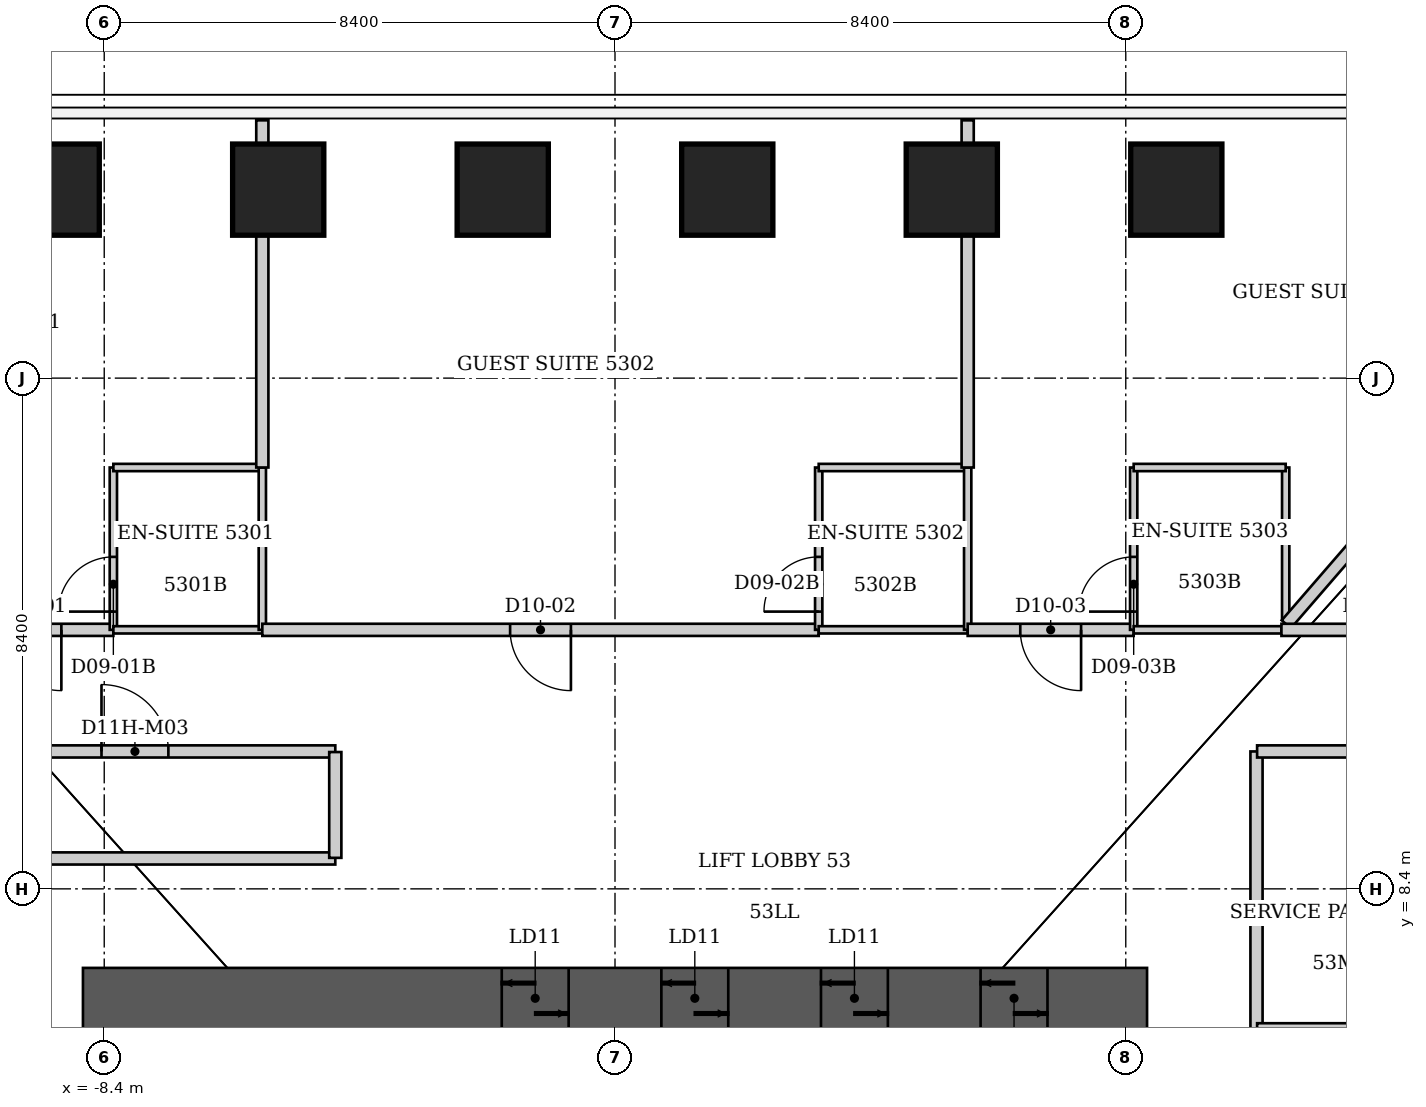
"""IFC4 building model, lengths in metres.
Left out: names, types, materials, properties, quantities, classifications, styles, units other than length and angle.
Written with IfcOpenShell. Run it as: python <this file> out.ifc"""

import sys

from ifc_helpers import new_model, si_unit, direction, frame, frame_2d, origin, origin_2d, place, context, subcontext, project, spatial, rectangle, extrude, element, fill, save


model = new_model("IFC4")
c1 = context("Model", 3, precision=1e-05, world=origin(), true_north=direction((0.0, 1.0)))
c2 = subcontext(c1, "Body", "Model", "MODEL_VIEW")
j1 = project(units=[si_unit("LENGTHUNIT", "METRE"), si_unit("PLANEANGLEUNIT", "RADIAN")], contexts=[c1])
p1 = place(None, origin())
s1 = spatial("IfcSite", under=j1, at=p1, CompositionType="ELEMENT")
p2 = place(p1, origin())
s2 = spatial("IfcBuilding", under=s1, at=p2, CompositionType="ELEMENT")
p3 = place(p2, frame((0.0, 0.0, 213.6)))
s3 = spatial("IfcBuildingStorey", under=s2, at=p3, CompositionType="ELEMENT", Elevation=213.6)
for number, where, z_axis, x_axis in (
    (1, (-9.231, 19.9, 0.0), (0.0, 0.0, 1.0), (0.0, 1.0, 0.0)),
    (2, (-5.539, 19.9, 0.0), (0.0, 0.0, 1.0), (0.0, 1.0, 0.0)),
    (3, (-1.846, 19.9, 0.0), (0.0, 0.0, 1.0), (0.0, 1.0, 0.0)),
    (4, (1.846, 19.9, 0.0), (0.0, 0.0, 1.0), (0.0, 1.0, 0.0)),
    (5, (5.539, 19.9, 0.0), (0.0, 0.0, 1.0), (0.0, 1.0, 0.0)),
    (6, (9.231, 19.9, 0.0), (0.0, 0.0, 1.0), (0.0, 1.0, 0.0)),
):
    element("IfcColumn", number, at=place(p3, frame(where, z_axis=z_axis, x_axis=x_axis)), inside=s3, PredefinedType="COLUMN", context=c2, shape_type="SweptSolid", body=[
        extrude(rectangle(XDim=1.5, YDim=1.5, at=origin_2d()), origin(), (0.0, 0.0, 1.0), 3.8),
    ])
p4 = place(p3, frame((-8.75, 6.6, 0.0), z_axis=(0.0, 0.0, 1.0), x_axis=(1.0, 0.0, 0.0)))
e7 = element("IfcWall", 7, at=p4, inside=s3, PredefinedType="SHEAR", context=c2, shape_type="SweptSolid", body=[
    extrude(rectangle(XDim=17.5, YDim=1.0, at=frame_2d((8.75, 0.0))), origin(), (0.0, 0.0, 1.0), 3.8),
])
p5 = place(p4, frame((6.887, 0.0, 0.0)))
e8 = element("IfcOpeningElement", 8, at=p5, cuts=e7, PredefinedType="OPENING", context=c2, shape_type="SweptSolid", body=[
    extrude(rectangle(XDim=1.1, YDim=2.1, at=frame_2d((0.55, 1.05))), frame((0.0, 0.5, 0.0), z_axis=(0.0, -1.0, 0.0), x_axis=(1.0, 0.0, 0.0)), (0.0, 0.0, 1.0), 1.0),
])
p6 = place(p4, frame((9.512, 0.0, 0.0)))
e9 = element("IfcOpeningElement", 9, at=p6, cuts=e7, PredefinedType="OPENING", context=c2, shape_type="SweptSolid", body=[
    extrude(rectangle(XDim=1.1, YDim=2.1, at=frame_2d((0.55, 1.05))), frame((0.0, 0.5, 0.0), z_axis=(0.0, -1.0, 0.0), x_axis=(1.0, 0.0, 0.0)), (0.0, 0.0, 1.0), 1.0),
])
p7 = place(p4, frame((12.137, 0.0, 0.0)))
e10 = element("IfcOpeningElement", 10, at=p7, cuts=e7, PredefinedType="OPENING", context=c2, shape_type="SweptSolid", body=[
    extrude(rectangle(XDim=1.1, YDim=2.1, at=frame_2d((0.55, 1.05))), frame((0.0, 0.5, 0.0), z_axis=(0.0, -1.0, 0.0), x_axis=(1.0, 0.0, 0.0)), (0.0, 0.0, 1.0), 1.0),
])
p8 = place(p4, frame((14.762, 0.0, 0.0)))
e11 = element("IfcOpeningElement", 11, at=p8, cuts=e7, PredefinedType="OPENING", context=c2, shape_type="SweptSolid", body=[
    extrude(rectangle(XDim=1.1, YDim=2.1, at=frame_2d((0.55, 1.05))), frame((0.0, 0.5, 0.0), z_axis=(0.0, -1.0, 0.0), x_axis=(1.0, 0.0, 0.0)), (0.0, 0.0, 1.0), 1.0),
])
p9 = place(p3, frame((-11.19, 10.66, 0.0), z_axis=(0.0, 0.0, 1.0), x_axis=(1.0, 0.0, 0.0)))
e12 = element("IfcWall", 12, at=p9, inside=s3, PredefinedType="PARTITIONING", context=c2, shape_type="SweptSolid", body=[
    extrude(rectangle(XDim=6.59, YDim=0.2, at=frame_2d((3.295, 0.0))), origin(), (0.0, 0.0, 1.0), 3.64),
])
p10 = place(p9, frame((2.745, 0.0, 0.0)))
e13 = element("IfcOpeningElement", 13, at=p10, cuts=e12, PredefinedType="OPENING", context=c2, shape_type="SweptSolid", body=[
    extrude(rectangle(XDim=1.1, YDim=2.2, at=frame_2d((0.55, 1.1))), frame((0.0, 0.1, 0.0), z_axis=(0.0, -1.0, 0.0), x_axis=(1.0, 0.0, 0.0)), (0.0, 0.0, 1.0), 0.2),
])
p11 = place(p3, frame((-8.25, 12.66, 0.0), z_axis=(0.0, 0.0, 1.0), x_axis=(-1.0, 0.0, 0.0)))
e14 = element("IfcWall", 14, at=p11, inside=s3, PredefinedType="PARTITIONING", context=c2, shape_type="SweptSolid", body=[
    extrude(rectangle(XDim=2.71, YDim=0.2, at=frame_2d((1.355, 0.0))), origin(), (0.0, 0.0, 1.0), 3.64),
])
p12 = place(p11, frame((0.855, 0.0, 0.0)))
e15 = element("IfcOpeningElement", 15, at=p12, cuts=e14, PredefinedType="OPENING", context=c2, shape_type="SweptSolid", body=[
    extrude(rectangle(XDim=1.0, YDim=2.13, at=frame_2d((0.5, 1.065))), frame((0.0, 0.1, 0.0), z_axis=(0.0, -1.0, 0.0), x_axis=(1.0, 0.0, 0.0)), (0.0, 0.0, 1.0), 0.2),
])
p13 = place(p3, frame((-8.25, 15.33, 0.0), z_axis=(0.0, 0.0, 1.0), x_axis=(0.0, -1.0, 0.0)))
e16 = element("IfcWall", 16, at=p13, inside=s3, PredefinedType="PARTITIONING", context=c2, shape_type="SweptSolid", body=[
    extrude(rectangle(XDim=2.67, YDim=0.12, at=frame_2d((1.335, 0.0))), origin(), (0.0, 0.0, 1.0), 3.64),
])
p14 = place(p13, frame((1.47, 0.0, 0.0)))
e17 = element("IfcOpeningElement", 17, at=p14, cuts=e16, PredefinedType="OPENING", context=c2, shape_type="SweptSolid", body=[
    extrude(rectangle(XDim=0.9, YDim=2.03, at=frame_2d((0.45, 1.015))), frame((0.0, 0.06, 0.0), z_axis=(0.0, -1.0, 0.0), x_axis=(1.0, 0.0, 0.0)), (0.0, 0.0, 1.0), 0.12),
])
for number, where, z_axis, x_axis in (
    (18, (-5.8, 12.66, 0.0), (0.0, 0.0, 1.0), (-1.0, 0.0, 0.0)),
    (19, (-5.8, 15.33, 0.0), (0.0, 0.0, 1.0), (-1.0, 0.0, 0.0)),
):
    element("IfcWall", number, at=place(p3, frame(where, z_axis=z_axis, x_axis=x_axis)), inside=s3, PredefinedType="PARTITIONING", context=c2, shape_type="SweptSolid", body=[
        extrude(rectangle(XDim=2.45, YDim=0.12, at=frame_2d((1.225, 0.0))), origin(), (0.0, 0.0, 1.0), 3.64),
    ])
p15 = place(p3, frame((-5.8, 15.33, 0.0), z_axis=(0.0, 0.0, 1.0), x_axis=(0.0, -1.0, 0.0)))
e20 = element("IfcWall", 20, at=p15, inside=s3, PredefinedType="PARTITIONING", context=c2, shape_type="SweptSolid", body=[
    extrude(rectangle(XDim=2.67, YDim=0.12, at=frame_2d((1.335, 0.0))), origin(), (0.0, 0.0, 1.0), 3.64),
])
p16 = place(p3, frame((-5.8, 21.04, 0.0), z_axis=(0.0, 0.0, 1.0), x_axis=(0.0, -1.0, 0.0)))
e21 = element("IfcWall", 21, at=p16, inside=s3, PredefinedType="PARTITIONING", context=c2, shape_type="SweptSolid", body=[
    extrude(rectangle(XDim=5.71, YDim=0.2, at=frame_2d((2.855, 0.0))), origin(), (0.0, 0.0, 1.0), 3.64),
])
p17 = place(p3, frame((-4.6, 8.9, 0.0), z_axis=(0.0, 0.0, 1.0), x_axis=(-1.0, 0.0, 0.0)))
e22 = element("IfcWall", 22, at=p17, inside=s3, PredefinedType="PARTITIONING", context=c2, shape_type="SweptSolid", body=[
    extrude(rectangle(XDim=5.95, YDim=0.2, at=frame_2d((2.975, 0.0))), origin(), (0.0, 0.0, 1.0), 3.64),
])
p18 = place(p3, frame((-4.6, 10.65, 0.0), z_axis=(0.0, 0.0, 1.0), x_axis=(0.0, -1.0, 0.0)))
e23 = element("IfcWall", 23, at=p18, inside=s3, PredefinedType="PARTITIONING", context=c2, shape_type="SweptSolid", body=[
    extrude(rectangle(XDim=1.74, YDim=0.2, at=frame_2d((0.87, 0.0))), origin(), (0.0, 0.0, 1.0), 3.64),
])
p19 = place(p3, frame((3.35, 12.66, 0.0), z_axis=(0.0, 0.0, 1.0), x_axis=(-1.0, 0.0, 0.0)))
e24 = element("IfcWall", 24, at=p19, inside=s3, PredefinedType="PARTITIONING", context=c2, shape_type="SweptSolid", body=[
    extrude(rectangle(XDim=9.15, YDim=0.2, at=frame_2d((4.575, 0.0))), origin(), (0.0, 0.0, 1.0), 3.64),
])
p20 = place(p19, frame((4.075, 0.0, 0.0)))
e25 = element("IfcOpeningElement", 25, at=p20, cuts=e24, PredefinedType="OPENING", context=c2, shape_type="SweptSolid", body=[
    extrude(rectangle(XDim=1.0, YDim=2.13, at=frame_2d((0.5, 1.065))), frame((0.0, 0.1, 0.0), z_axis=(0.0, -1.0, 0.0), x_axis=(1.0, 0.0, 0.0)), (0.0, 0.0, 1.0), 0.2),
])
p21 = place(p3, frame((3.35, 15.33, 0.0), z_axis=(0.0, 0.0, 1.0), x_axis=(0.0, -1.0, 0.0)))
e26 = element("IfcWall", 26, at=p21, inside=s3, PredefinedType="PARTITIONING", context=c2, shape_type="SweptSolid", body=[
    extrude(rectangle(XDim=2.67, YDim=0.12, at=frame_2d((1.335, 0.0))), origin(), (0.0, 0.0, 1.0), 3.64),
])
p22 = place(p21, frame((1.47, 0.0, 0.0)))
e27 = element("IfcOpeningElement", 27, at=p22, cuts=e26, PredefinedType="OPENING", context=c2, shape_type="SweptSolid", body=[
    extrude(rectangle(XDim=0.9, YDim=2.03, at=frame_2d((0.45, 1.015))), frame((0.0, 0.06, 0.0), z_axis=(0.0, -1.0, 0.0), x_axis=(1.0, 0.0, 0.0)), (0.0, 0.0, 1.0), 0.12),
])
for number, where, z_axis, x_axis in (
    (28, (5.8, 12.66, 0.0), (0.0, 0.0, 1.0), (-1.0, 0.0, 0.0)),
    (29, (5.8, 15.33, 0.0), (0.0, 0.0, 1.0), (-1.0, 0.0, 0.0)),
):
    element("IfcWall", number, at=place(p3, frame(where, z_axis=z_axis, x_axis=x_axis)), inside=s3, PredefinedType="PARTITIONING", context=c2, shape_type="SweptSolid", body=[
        extrude(rectangle(XDim=2.45, YDim=0.12, at=frame_2d((1.225, 0.0))), origin(), (0.0, 0.0, 1.0), 3.64),
    ])
p23 = place(p3, frame((5.8, 15.33, 0.0), z_axis=(0.0, 0.0, 1.0), x_axis=(0.0, -1.0, 0.0)))
e30 = element("IfcWall", 30, at=p23, inside=s3, PredefinedType="PARTITIONING", context=c2, shape_type="SweptSolid", body=[
    extrude(rectangle(XDim=2.67, YDim=0.12, at=frame_2d((1.335, 0.0))), origin(), (0.0, 0.0, 1.0), 3.64),
])
p24 = place(p3, frame((5.8, 21.04, 0.0), z_axis=(0.0, 0.0, 1.0), x_axis=(0.0, -1.0, 0.0)))
e31 = element("IfcWall", 31, at=p24, inside=s3, PredefinedType="PARTITIONING", context=c2, shape_type="SweptSolid", body=[
    extrude(rectangle(XDim=5.71, YDim=0.2, at=frame_2d((2.855, 0.0))), origin(), (0.0, 0.0, 1.0), 3.64),
])
p25 = place(p3, frame((8.53, 12.66, 0.0), z_axis=(0.0, 0.0, 1.0), x_axis=(-1.0, 0.0, 0.0)))
e32 = element("IfcWall", 32, at=p25, inside=s3, PredefinedType="PARTITIONING", context=c2, shape_type="SweptSolid", body=[
    extrude(rectangle(XDim=2.73, YDim=0.2, at=frame_2d((1.365, 0.0))), origin(), (0.0, 0.0, 1.0), 3.64),
])
p26 = place(p25, frame((0.865, 0.0, 0.0)))
e33 = element("IfcOpeningElement", 33, at=p26, cuts=e32, PredefinedType="OPENING", context=c2, shape_type="SweptSolid", body=[
    extrude(rectangle(XDim=1.0, YDim=2.13, at=frame_2d((0.5, 1.065))), frame((0.0, 0.1, 0.0), z_axis=(0.0, -1.0, 0.0), x_axis=(1.0, 0.0, 0.0)), (0.0, 0.0, 1.0), 0.2),
])
p27 = place(p3, frame((8.53, 15.33, 0.0), z_axis=(0.0, 0.0, 1.0), x_axis=(0.0, -1.0, 0.0)))
e34 = element("IfcWall", 34, at=p27, inside=s3, PredefinedType="PARTITIONING", context=c2, shape_type="SweptSolid", body=[
    extrude(rectangle(XDim=2.67, YDim=0.12, at=frame_2d((1.335, 0.0))), origin(), (0.0, 0.0, 1.0), 3.64),
])
p28 = place(p27, frame((1.47, 0.0, 0.0)))
e35 = element("IfcOpeningElement", 35, at=p28, cuts=e34, PredefinedType="OPENING", context=c2, shape_type="SweptSolid", body=[
    extrude(rectangle(XDim=0.9, YDim=2.03, at=frame_2d((0.45, 1.015))), frame((0.0, 0.06, 0.0), z_axis=(0.0, -1.0, 0.0), x_axis=(1.0, 0.0, 0.0)), (0.0, 0.0, 1.0), 0.12),
])
p29 = place(p3, frame((10.55, 6.09, 0.0), z_axis=(0.0, 0.0, 1.0), x_axis=(0.0, 1.0, 0.0)))
e36 = element("IfcWall", 36, at=p29, inside=s3, PredefinedType="PARTITIONING", context=c2, shape_type="SweptSolid", body=[
    extrude(rectangle(XDim=4.57, YDim=0.2, at=frame_2d((2.285, 0.0))), origin(), (0.0, 0.0, 1.0), 3.64),
])
p30 = place(p3, frame((10.56, 10.66, 0.0), z_axis=(0.0, 0.0, 1.0), x_axis=(1.0, 0.0, 0.0)))
e37 = element("IfcWall", 37, at=p30, inside=s3, PredefinedType="PARTITIONING", context=c2, shape_type="SweptSolid", body=[
    extrude(rectangle(XDim=1.79, YDim=0.2, at=frame_2d((0.895, 0.0))), origin(), (0.0, 0.0, 1.0), 3.64),
])
p31 = place(p3, frame((10.96, 12.66, 0.0), z_axis=(0.0, 0.0, 1.0), x_axis=(-1.0, 0.0, 0.0)))
e38 = element("IfcWall", 38, at=p31, inside=s3, PredefinedType="PARTITIONING", context=c2, shape_type="SweptSolid", body=[
    extrude(rectangle(XDim=2.43, YDim=0.12, at=frame_2d((1.215, 0.0))), origin(), (0.0, 0.0, 1.0), 3.64),
])
p32 = place(p3, frame((11.03, 12.83, 0.0), z_axis=(0.0, 0.0, 1.0), x_axis=(0.0, 1.0, 0.0)))
e39 = element("IfcWall", 39, at=p32, inside=s3, PredefinedType="PARTITIONING", context=c2, shape_type="SweptSolid", body=[
    extrude(rectangle(XDim=2.5, YDim=0.12, at=frame_2d((1.25, 0.0))), origin(), (0.0, 0.0, 1.0), 3.038),
])
p33 = place(p3, frame((11.03, 15.33, 0.0), z_axis=(0.0, 0.0, 1.0), x_axis=(-1.0, 0.0, 0.0)))
e40 = element("IfcWall", 40, at=p33, inside=s3, PredefinedType="PARTITIONING", context=c2, shape_type="SweptSolid", body=[
    extrude(rectangle(XDim=2.5, YDim=0.12, at=frame_2d((1.25, 0.0))), origin(), (0.0, 0.0, 1.0), 3.64),
])
p34 = place(p3, frame((11.04, 12.751, 0.0), z_axis=(0.0, 0.0, 1.0), x_axis=(0.654384042683, 0.756162366613, 0.0)))
e41 = element("IfcWall", 41, at=p34, inside=s3, PredefinedType="PARTITIONING", context=c2, shape_type="SweptSolid", body=[
    extrude(rectangle(XDim=10.667, YDim=0.2, at=frame_2d((5.333, 0.0))), origin(), (0.0, 0.0, 1.0), 3.64),
])
p35 = place(p3, frame((13.5, 12.66, 0.0), z_axis=(0.0, 0.0, 1.0), x_axis=(-1.0, 0.0, 0.0)))
e42 = element("IfcWall", 42, at=p35, inside=s3, PredefinedType="PARTITIONING", context=c2, shape_type="SweptSolid", body=[
    extrude(rectangle(XDim=2.54, YDim=0.2, at=frame_2d((1.27, 0.0))), origin(), (0.0, 0.0, 1.0), 3.64),
])
p36 = place(p35, frame((0.45, 0.0, 0.0)))
e43 = element("IfcOpeningElement", 43, at=p36, cuts=e42, PredefinedType="OPENING", context=c2, shape_type="SweptSolid", body=[
    extrude(rectangle(XDim=1.0, YDim=2.13, at=frame_2d((0.5, 1.065))), frame((0.0, 0.1, 0.0), z_axis=(0.0, -1.0, 0.0), x_axis=(1.0, 0.0, 0.0)), (0.0, 0.0, 1.0), 0.2),
])
p37 = place(p3, frame((14.915, 6.09, 0.0), z_axis=(0.0, 0.0, 1.0), x_axis=(-1.0, 0.0, 0.0)))
e44 = element("IfcWall", 44, at=p37, inside=s3, PredefinedType="PARTITIONING", context=c2, shape_type="SweptSolid", body=[
    extrude(rectangle(XDim=4.355, YDim=0.2, at=frame_2d((2.177, 0.0))), origin(), (0.0, 0.0, 1.0), 3.64),
])
p38 = place(p12, origin())
e45 = element("IfcDoor", 45, at=p38, inside=s3, OperationType="SINGLE_SWING_LEFT", PredefinedType="DOOR", context=c2, shape_type="SweptSolid", body=[
    extrude(rectangle(XDim=1.0, YDim=2.13, at=frame_2d((0.5, 1.065))), frame((0.0, 0.025, 0.0), z_axis=(0.0, -1.0, 0.0), x_axis=(1.0, 0.0, 0.0)), (0.0, 0.0, 1.0), 0.05),
])
fill(e15, e45)
p39 = place(p14, origin())
e46 = element("IfcDoor", 46, at=p39, inside=s3, OperationType="SINGLE_SWING_RIGHT", PredefinedType="DOOR", context=c2, shape_type="SweptSolid", body=[
    extrude(rectangle(XDim=0.9, YDim=2.03, at=frame_2d((0.45, 1.015))), frame((0.0, 0.025, 0.0), z_axis=(0.0, -1.0, 0.0), x_axis=(1.0, 0.0, 0.0)), (0.0, 0.0, 1.0), 0.05),
])
fill(e17, e46)
p40 = place(p20, origin())
e47 = element("IfcDoor", 47, at=p40, inside=s3, OperationType="SINGLE_SWING_LEFT", PredefinedType="DOOR", context=c2, shape_type="SweptSolid", body=[
    extrude(rectangle(XDim=1.0, YDim=2.13, at=frame_2d((0.5, 1.065))), frame((0.0, 0.025, 0.0), z_axis=(0.0, -1.0, 0.0), x_axis=(1.0, 0.0, 0.0)), (0.0, 0.0, 1.0), 0.05),
])
fill(e25, e47)
p41 = place(p22, origin())
e48 = element("IfcDoor", 48, at=p41, inside=s3, OperationType="SINGLE_SWING_RIGHT", PredefinedType="DOOR", context=c2, shape_type="SweptSolid", body=[
    extrude(rectangle(XDim=0.9, YDim=2.03, at=frame_2d((0.45, 1.015))), frame((0.0, 0.025, 0.0), z_axis=(0.0, -1.0, 0.0), x_axis=(1.0, 0.0, 0.0)), (0.0, 0.0, 1.0), 0.05),
])
fill(e27, e48)
p42 = place(p26, origin())
e49 = element("IfcDoor", 49, at=p42, inside=s3, OperationType="SINGLE_SWING_LEFT", PredefinedType="DOOR", context=c2, shape_type="SweptSolid", body=[
    extrude(rectangle(XDim=1.0, YDim=2.13, at=frame_2d((0.5, 1.065))), frame((0.0, 0.025, 0.0), z_axis=(0.0, -1.0, 0.0), x_axis=(1.0, 0.0, 0.0)), (0.0, 0.0, 1.0), 0.05),
])
fill(e33, e49)
p43 = place(p28, origin())
e50 = element("IfcDoor", 50, at=p43, inside=s3, OperationType="SINGLE_SWING_RIGHT", PredefinedType="DOOR", context=c2, shape_type="SweptSolid", body=[
    extrude(rectangle(XDim=0.9, YDim=2.03, at=frame_2d((0.45, 1.015))), frame((0.0, 0.025, 0.0), z_axis=(0.0, -1.0, 0.0), x_axis=(1.0, 0.0, 0.0)), (0.0, 0.0, 1.0), 0.05),
])
fill(e35, e50)
p44 = place(p10, origin())
e51 = element("IfcDoor", 51, at=p44, inside=s3, OperationType="SINGLE_SWING_LEFT", PredefinedType="DOOR", context=c2, shape_type="SweptSolid", body=[
    extrude(rectangle(XDim=1.1, YDim=2.2, at=frame_2d((0.55, 1.1))), frame((0.0, 0.025, 0.0), z_axis=(0.0, -1.0, 0.0), x_axis=(1.0, 0.0, 0.0)), (0.0, 0.0, 1.0), 0.05),
])
fill(e13, e51)
p45 = place(p5, origin())
e52 = element("IfcDoor", 52, at=p45, inside=s3, OperationType="DOUBLE_DOOR_SLIDING", PredefinedType="DOOR", context=c2, shape_type="SweptSolid", body=[
    extrude(rectangle(XDim=1.1, YDim=2.1, at=frame_2d((0.55, 1.05))), frame((0.0, 0.025, 0.0), z_axis=(0.0, -1.0, 0.0), x_axis=(1.0, 0.0, 0.0)), (0.0, 0.0, 1.0), 0.05),
])
fill(e8, e52)
p46 = place(p6, origin())
e53 = element("IfcDoor", 53, at=p46, inside=s3, OperationType="DOUBLE_DOOR_SLIDING", PredefinedType="DOOR", context=c2, shape_type="SweptSolid", body=[
    extrude(rectangle(XDim=1.1, YDim=2.1, at=frame_2d((0.55, 1.05))), frame((0.0, 0.025, 0.0), z_axis=(0.0, -1.0, 0.0), x_axis=(1.0, 0.0, 0.0)), (0.0, 0.0, 1.0), 0.05),
])
fill(e9, e53)
p47 = place(p7, origin())
e54 = element("IfcDoor", 54, at=p47, inside=s3, OperationType="DOUBLE_DOOR_SLIDING", PredefinedType="DOOR", context=c2, shape_type="SweptSolid", body=[
    extrude(rectangle(XDim=1.1, YDim=2.1, at=frame_2d((0.55, 1.05))), frame((0.0, 0.025, 0.0), z_axis=(0.0, -1.0, 0.0), x_axis=(1.0, 0.0, 0.0)), (0.0, 0.0, 1.0), 0.05),
])
fill(e10, e54)
p48 = place(p8, origin())
e55 = element("IfcDoor", 55, at=p48, inside=s3, OperationType="DOUBLE_DOOR_SLIDING", PredefinedType="DOOR", context=c2, shape_type="SweptSolid", body=[
    extrude(rectangle(XDim=1.1, YDim=2.1, at=frame_2d((0.55, 1.05))), frame((0.0, 0.025, 0.0), z_axis=(0.0, -1.0, 0.0), x_axis=(1.0, 0.0, 0.0)), (0.0, 0.0, 1.0), 0.05),
])
fill(e11, e55)
save(model, sys.argv[1])
